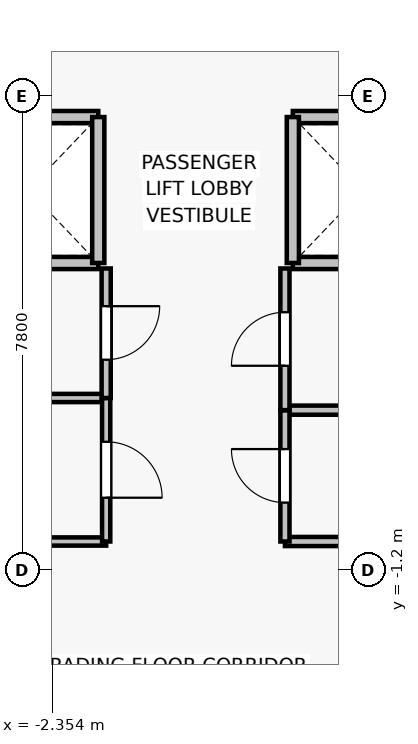
"""IFC4 building model, lengths in metres.
Left out: names, types, materials, properties, quantities, classifications, styles, units other than length and angle.
Written with IfcOpenShell. Run it as: python <this file> out.ifc"""

import sys

from ifc_helpers import new_model, si_unit, direction, frame, frame_2d, origin, place, context, subcontext, project, spatial, rectangle, extrude, source, transform, mapped, element, fill, save


model = new_model("IFC4")
c1 = context("Model", 3, precision=1e-05, world=origin(), true_north=direction((0.0, 1.0)))
c2 = subcontext(c1, "Body", "Model", "MODEL_VIEW")
j1 = project(units=[si_unit("LENGTHUNIT", "METRE"), si_unit("PLANEANGLEUNIT", "RADIAN")], contexts=[c1])
p1 = place(None, origin())
s1 = spatial("IfcSite", under=j1, at=p1, CompositionType="ELEMENT")
p2 = place(p1, origin())
s2 = spatial("IfcBuilding", under=s1, at=p2, CompositionType="ELEMENT")
p3 = place(p2, frame((0.0, 0.0, 43.9)))
s3 = spatial("IfcBuildingStorey", under=s2, at=p3, CompositionType="ELEMENT", Elevation=43.9)
for number, where, z_axis, x_axis in (
    (1, (-1.6, 3.85, 0.0), (0.0, 0.0, 1.0), (-1.0, 0.0, 0.0)),
    (2, (-3.9, 6.25, 0.0), (0.0, 0.0, 1.0), (1.0, 0.0, 0.0)),
):
    element("IfcWall", number, at=place(p3, frame(where, z_axis=z_axis, x_axis=x_axis)), inside=s3, PredefinedType="SOLIDWALL", context=c2, shape_type="SweptSolid", body=[
        extrude(rectangle(XDim=2.3, YDim=0.2, at=frame_2d((1.15, 0.0))), origin(), (0.0, 0.0, 1.0), 3.075),
    ])
p4 = place(p3, frame((-1.6, 6.25, 0.0), z_axis=(0.0, 0.0, 1.0), x_axis=(0.0, -1.0, 0.0)))
e3 = element("IfcWall", 3, at=p4, inside=s3, PredefinedType="SOLIDWALL", context=c2, shape_type="SweptSolid", body=[
    extrude(rectangle(XDim=2.4, YDim=0.2, at=frame_2d((1.2, 0.0))), origin(), (0.0, 0.0, 1.0), 3.075),
])
for number, where, z_axis, x_axis in (
    (4, (3.9, 3.85, 0.0), (0.0, 0.0, 1.0), (-1.0, 0.0, 0.0)),
    (5, (1.6, 6.25, 0.0), (0.0, 0.0, 1.0), (1.0, 0.0, 0.0)),
):
    element("IfcWall", number, at=place(p3, frame(where, z_axis=z_axis, x_axis=x_axis)), inside=s3, PredefinedType="SOLIDWALL", context=c2, shape_type="SweptSolid", body=[
        extrude(rectangle(XDim=2.3, YDim=0.2, at=frame_2d((1.15, 0.0))), origin(), (0.0, 0.0, 1.0), 3.075),
    ])
p5 = place(p3, frame((1.6, 3.85, 0.0), z_axis=(0.0, 0.0, 1.0), x_axis=(0.0, 1.0, 0.0)))
e6 = element("IfcWall", 6, at=p5, inside=s3, PredefinedType="SOLIDWALL", context=c2, shape_type="SweptSolid", body=[
    extrude(rectangle(XDim=2.4, YDim=0.2, at=frame_2d((1.2, 0.0))), origin(), (0.0, 0.0, 1.0), 3.075),
])
for number, where, z_axis, x_axis in (
    (7, (-1.47, -0.73, 0.0), (0.0, 0.0, 1.0), (-1.0, 0.0, 0.0)),
    (8, (-3.47, 1.63, 0.0), (0.0, 0.0, 1.0), (1.0, 0.0, 0.0)),
):
    element("IfcWall", number, at=place(p3, frame(where, z_axis=z_axis, x_axis=x_axis)), inside=s3, PredefinedType="PARTITIONING", context=c2, shape_type="SweptSolid", body=[
        extrude(rectangle(XDim=2.0, YDim=0.135, at=frame_2d((1.0, 0.0))), origin(), (0.0, 0.0, 1.0), 3.075),
    ])
p6 = place(p3, frame((-1.47, 1.63, 0.0), z_axis=(0.0, 0.0, 1.0), x_axis=(0.0, -1.0, 0.0)))
e9 = element("IfcWall", 9, at=p6, inside=s3, PredefinedType="PARTITIONING", context=c2, shape_type="SweptSolid", body=[
    extrude(rectangle(XDim=2.36, YDim=0.135, at=frame_2d((1.18, 0.0))), origin(), (0.0, 0.0, 1.0), 3.075),
])
p7 = place(p6, frame((0.72, 0.0, 0.0)))
e10 = element("IfcOpeningElement", 10, at=p7, cuts=e9, PredefinedType="OPENING", context=c2, shape_type="SweptSolid", body=[
    extrude(rectangle(XDim=0.92, YDim=2.1, at=frame_2d((0.46, 1.05))), frame((0.0, 0.077, 0.0), z_axis=(0.0, -1.0, 0.0), x_axis=(1.0, 0.0, 0.0)), (0.0, 0.0, 1.0), 0.155),
])
p8 = place(p3, frame((-1.47, 3.76, 0.0), z_axis=(0.0, 0.0, 1.0), x_axis=(0.0, -1.0, 0.0)))
e11 = element("IfcWall", 11, at=p8, inside=s3, PredefinedType="PARTITIONING", context=c2, shape_type="SweptSolid", body=[
    extrude(rectangle(XDim=2.13, YDim=0.15, at=frame_2d((1.065, 0.0))), origin(), (0.0, 0.0, 1.0), 3.075),
])
p9 = place(p8, frame((0.62, 0.0, 0.0)))
e12 = element("IfcOpeningElement", 12, at=p9, cuts=e11, PredefinedType="OPENING", context=c2, shape_type="SweptSolid", body=[
    extrude(rectangle(XDim=0.88, YDim=2.1, at=frame_2d((0.44, 1.05))), frame((0.0, 0.085, 0.0), z_axis=(0.0, -1.0, 0.0), x_axis=(1.0, 0.0, 0.0)), (0.0, 0.0, 1.0), 0.17),
])
for number, where, z_axis, x_axis in (
    (13, (3.68, -0.73, 0.0), (0.0, 0.0, 1.0), (-1.0, 0.0, 0.0)),
    (14, (1.47, 1.43, 0.0), (0.0, 0.0, 1.0), (1.0, 0.0, 0.0)),
):
    element("IfcWall", number, at=place(p3, frame(where, z_axis=z_axis, x_axis=x_axis)), inside=s3, PredefinedType="PARTITIONING", context=c2, shape_type="SweptSolid", body=[
        extrude(rectangle(XDim=2.21, YDim=0.15, at=frame_2d((1.105, 0.0))), origin(), (0.0, 0.0, 1.0), 3.075),
    ])
p10 = place(p3, frame((1.47, -0.73, 0.0), z_axis=(0.0, 0.0, 1.0), x_axis=(0.0, 1.0, 0.0)))
e15 = element("IfcWall", 15, at=p10, inside=s3, PredefinedType="PARTITIONING", context=c2, shape_type="SweptSolid", body=[
    extrude(rectangle(XDim=2.16, YDim=0.15, at=frame_2d((1.08, 0.0))), origin(), (0.0, 0.0, 1.0), 3.075),
])
p11 = place(p10, frame((0.64, 0.0, 0.0)))
e16 = element("IfcOpeningElement", 16, at=p11, cuts=e15, PredefinedType="OPENING", context=c2, shape_type="SweptSolid", body=[
    extrude(rectangle(XDim=0.88, YDim=2.1, at=frame_2d((0.44, 1.05))), frame((0.0, 0.085, 0.0), z_axis=(0.0, -1.0, 0.0), x_axis=(1.0, 0.0, 0.0)), (0.0, 0.0, 1.0), 0.17),
])
p12 = place(p3, frame((1.47, 1.43, 0.0), z_axis=(0.0, 0.0, 1.0), x_axis=(0.0, 1.0, 0.0)))
e17 = element("IfcWall", 17, at=p12, inside=s3, PredefinedType="PARTITIONING", context=c2, shape_type="SweptSolid", body=[
    extrude(rectangle(XDim=2.33, YDim=0.15, at=frame_2d((1.165, 0.0))), origin(), (0.0, 0.0, 1.0), 3.075),
])
p13 = place(p12, frame((0.73, 0.0, 0.0)))
e18 = element("IfcOpeningElement", 18, at=p13, cuts=e17, PredefinedType="OPENING", context=c2, shape_type="SweptSolid", body=[
    extrude(rectangle(XDim=0.88, YDim=2.15, at=frame_2d((0.44, 1.075))), frame((0.0, 0.085, 0.0), z_axis=(0.0, -1.0, 0.0), x_axis=(1.0, 0.0, 0.0)), (0.0, 0.0, 1.0), 0.17),
])
m1 = source(origin(), c2, "Body", "SweptSolid", [
    extrude(rectangle(XDim=0.92, YDim=2.1, at=frame_2d((0.46, 1.05))), frame((0.0, 0.025, 0.0), z_axis=(0.0, -1.0, 0.0), x_axis=(1.0, 0.0, 0.0)), (0.0, 0.0, 1.0), 0.05),
])
p14 = place(p7, origin())
e19 = element("IfcDoor", 19, at=p14, inside=s3, OperationType="SINGLE_SWING_RIGHT", PredefinedType="DOOR", context=c2, shape_type="MappedRepresentation", body=[
    mapped(m1, transform((0.0, 0.0, 0.0), x_axis=(1.0, 0.0, 0.0), y_axis=(0.0, 1.0, 0.0), z_axis=(0.0, 0.0, 1.0), scale=1.0)),
])
fill(e10, e19)
m2 = source(origin(), c2, "Body", "SweptSolid", [
    extrude(rectangle(XDim=0.88, YDim=2.1, at=frame_2d((0.44, 1.05))), frame((0.0, 0.025, 0.0), z_axis=(0.0, -1.0, 0.0), x_axis=(1.0, 0.0, 0.0)), (0.0, 0.0, 1.0), 0.05),
])
p15 = place(p9, origin())
e20 = element("IfcDoor", 20, at=p15, inside=s3, OperationType="SINGLE_SWING_LEFT", PredefinedType="DOOR", context=c2, shape_type="MappedRepresentation", body=[
    mapped(m2, transform((0.0, 0.0, 0.0), x_axis=(1.0, 0.0, 0.0), y_axis=(0.0, 1.0, 0.0), z_axis=(0.0, 0.0, 1.0), scale=1.0)),
])
fill(e12, e20)
p16 = place(p11, origin())
e21 = element("IfcDoor", 21, at=p16, inside=s3, OperationType="SINGLE_SWING_RIGHT", PredefinedType="DOOR", context=c2, shape_type="MappedRepresentation", body=[
    mapped(m2, transform((0.0, 0.0, 0.0), x_axis=(1.0, 0.0, 0.0), y_axis=(0.0, 1.0, 0.0), z_axis=(0.0, 0.0, 1.0), scale=1.0)),
])
fill(e16, e21)
m3 = source(origin(), c2, "Body", "SweptSolid", [
    extrude(rectangle(XDim=0.88, YDim=2.15, at=frame_2d((0.44, 1.075))), frame((0.0, 0.025, 0.0), z_axis=(0.0, -1.0, 0.0), x_axis=(1.0, 0.0, 0.0)), (0.0, 0.0, 1.0), 0.05),
])
p17 = place(p13, origin())
e22 = element("IfcDoor", 22, at=p17, inside=s3, OperationType="SINGLE_SWING_LEFT", PredefinedType="DOOR", context=c2, shape_type="MappedRepresentation", body=[
    mapped(m3, transform((0.0, 0.0, 0.0), x_axis=(1.0, 0.0, 0.0), y_axis=(0.0, 1.0, 0.0), z_axis=(0.0, 0.0, 1.0), scale=1.0)),
])
fill(e18, e22)
save(model, sys.argv[1])
